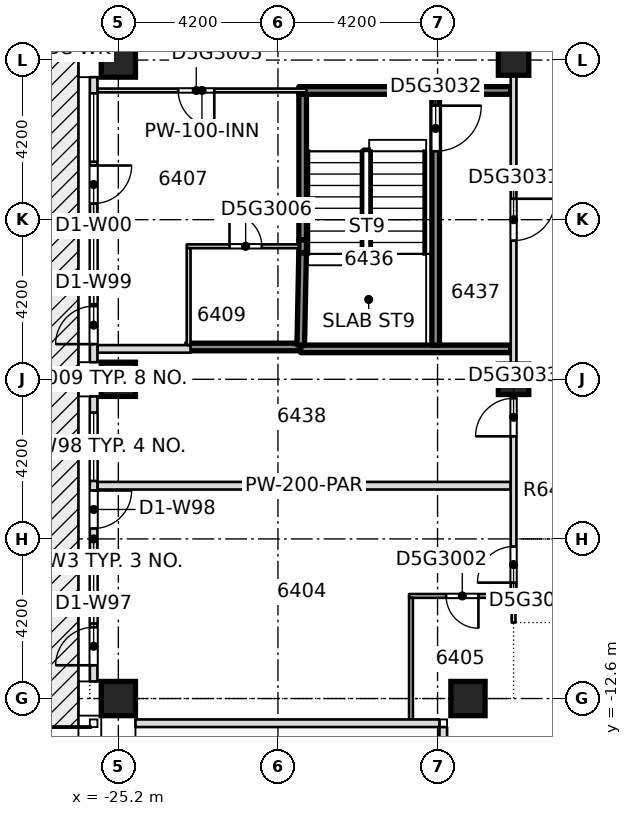
"""IFC4 building model, lengths in metres.
Left out: names, types, materials, properties, quantities, classifications, styles, units other than length and angle.
Written with IfcOpenShell. Run it as: python <this file> out.ifc"""

import sys

from ifc_helpers import new_model, si_unit, direction, frame, frame_2d, origin, origin_2d, place, context, subcontext, project, spatial, rectangle, extrude, element, fill, save


model = new_model("IFC4")
c1 = context("Model", 3, precision=1e-05, world=origin(), true_north=direction((0.0, 1.0)))
c2 = subcontext(c1, "Body", "Model", "MODEL_VIEW")
j1 = project(units=[si_unit("LENGTHUNIT", "METRE"), si_unit("PLANEANGLEUNIT", "RADIAN")], contexts=[c1])
p1 = place(None, origin())
s1 = spatial("IfcSite", under=j1, at=p1, CompositionType="ELEMENT")
p2 = place(p1, origin())
s2 = spatial("IfcBuilding", under=s1, at=p2, CompositionType="ELEMENT")
p3 = place(p2, frame((0.0, 0.0, 244.15)))
s3 = spatial("IfcBuildingStorey", under=s2, at=p3, CompositionType="ELEMENT", Elevation=244.15)
for number, where, z_axis, x_axis in (
    (1, (-25.2, -12.6, -0.4), (0.0, 0.0, 1.0), (1.0, 0.0, 0.0)),
    (2, (-16.0, -12.6, -0.4), (0.0, 0.0, 1.0), (1.0, 0.0, 0.0)),
    (3, (-25.2, -4.2, -0.4), (0.0, 0.0, 1.0), (1.0, 0.0, 0.0)),
    (4, (-25.2, 4.2, -0.4), (0.0, 0.0, 1.0), (1.0, 0.0, 0.0)),
):
    element("IfcColumn", number, at=place(p3, frame(where, z_axis=z_axis, x_axis=x_axis)), inside=s3, PredefinedType="COLUMN", context=c2, shape_type="SweptSolid", body=[
        extrude(rectangle(XDim=0.9, YDim=0.9, at=origin_2d()), origin(), (0.0, 0.0, 1.0), 3.45),
    ])
for number, where, z_axis, x_axis in (
    (5, (-14.8, -4.2, -0.4), (0.0, 0.0, 1.0), (1.0, 0.0, 0.0)),
    (6, (-14.8, 4.2, -0.4), (0.0, 0.0, 1.0), (1.0, 0.0, 0.0)),
):
    element("IfcColumn", number, at=place(p3, frame(where, z_axis=z_axis, x_axis=x_axis)), inside=s3, PredefinedType="COLUMN", context=c2, shape_type="SweptSolid", body=[
        extrude(rectangle(XDim=0.8, YDim=0.8, at=origin_2d()), origin(), (0.0, 0.0, 1.0), 3.45),
    ])
p4 = place(p3, frame((-17.55, -9.9, 0.0), z_axis=(0.0, 0.0, 1.0), x_axis=(1.0, 0.0, 0.0)))
e7 = element("IfcWall", 7, at=p4, inside=s3, PredefinedType="PARTITIONING", context=c2, shape_type="SweptSolid", body=[
    extrude(rectangle(XDim=2.825, YDim=0.1, at=frame_2d((1.413, 0.0))), origin(), (0.0, 0.0, 1.0), 3.05),
])
p5 = place(p4, frame((0.975, 0.0, 0.0)))
e8 = element("IfcOpeningElement", 8, at=p5, cuts=e7, PredefinedType="OPENING", context=c2, shape_type="SweptSolid", body=[
    extrude(rectangle(XDim=0.85, YDim=2.1, at=frame_2d((0.425, 1.05))), frame((0.0, 0.06, 0.0), z_axis=(0.0, -1.0, 0.0), x_axis=(1.0, 0.0, 0.0)), (0.0, 0.0, 1.0), 0.12),
])
p6 = place(p3, frame((-25.75, -7.0, 0.0), z_axis=(0.0, 0.0, 1.0), x_axis=(1.0, 0.0, 0.0)))
e9 = element("IfcWall", 9, at=p6, inside=s3, PredefinedType="PARTITIONING", context=c2, shape_type="SweptSolid", body=[
    extrude(rectangle(XDim=10.875, YDim=0.2, at=frame_2d((5.438, 0.0))), origin(), (0.0, 0.0, 1.0), 3.05),
])
p7 = place(p3, frame((-25.75, -3.4, 0.0), z_axis=(0.0, 0.0, 1.0), x_axis=(1.0, 0.0, 0.0)))
e10 = element("IfcWall", 10, at=p7, inside=s3, PredefinedType="PARTITIONING", context=c2, shape_type="SweptSolid", body=[
    extrude(rectangle(XDim=2.45, YDim=0.2, at=frame_2d((1.225, 0.0))), origin(), (0.0, 0.0, 1.0), 3.05),
])
p8 = place(p3, frame((-23.4, -3.35, 0.0), z_axis=(0.0, 0.0, 1.0), x_axis=(1.0, 0.0, 0.0)))
e11 = element("IfcWall", 11, at=p8, inside=s3, PredefinedType="SOLIDWALL", context=c2, shape_type="SweptSolid", body=[
    extrude(rectangle(XDim=3.1, YDim=0.2, at=frame_2d((1.55, 0.0))), origin(), (0.0, 0.0, 1.0), 3.05),
])
p9 = place(p3, frame((-20.4, -3.4, 0.0), z_axis=(0.0, 0.0, 1.0), x_axis=(1.0, 0.0, 0.0)))
e12 = element("IfcWall", 12, at=p9, inside=s3, PredefinedType="SOLIDWALL", context=c2, shape_type="SweptSolid", body=[
    extrude(rectangle(XDim=5.525, YDim=0.2, at=frame_2d((2.762, 0.0))), origin(), (0.0, 0.0, 1.0), 3.05),
])
p10 = place(p3, frame((-23.4, -0.7, 0.0), z_axis=(0.0, 0.0, 1.0), x_axis=(1.0, 0.0, 0.0)))
e13 = element("IfcWall", 13, at=p10, inside=s3, PredefinedType="PARTITIONING", context=c2, shape_type="SweptSolid", body=[
    extrude(rectangle(XDim=2.95, YDim=0.1, at=frame_2d((1.475, 0.0))), origin(), (0.0, 0.0, 1.0), 3.05),
])
p11 = place(p10, frame((1.125, 0.0, 0.0)))
e14 = element("IfcOpeningElement", 14, at=p11, cuts=e13, PredefinedType="OPENING", context=c2, shape_type="SweptSolid", body=[
    extrude(rectangle(XDim=0.85, YDim=2.1, at=frame_2d((0.425, 1.05))), frame((0.0, 0.06, 0.0), z_axis=(0.0, -1.0, 0.0), x_axis=(1.0, 0.0, 0.0)), (0.0, 0.0, 1.0), 0.12),
])
p12 = place(p3, frame((-25.75, 3.4, 0.0), z_axis=(0.0, 0.0, 1.0), x_axis=(1.0, 0.0, 0.0)))
e15 = element("IfcWall", 15, at=p12, inside=s3, PredefinedType="PARTITIONING", context=c2, shape_type="SweptSolid", body=[
    extrude(rectangle(XDim=5.5, YDim=0.1, at=frame_2d((2.75, 0.0))), origin(), (0.0, 0.0, 1.0), 3.05),
])
p13 = place(p12, frame((2.125, 0.0, 0.0)))
e16 = element("IfcOpeningElement", 16, at=p13, cuts=e15, PredefinedType="OPENING", context=c2, shape_type="SweptSolid", body=[
    extrude(rectangle(XDim=0.95, YDim=2.1, at=frame_2d((0.475, 1.05))), frame((0.0, 0.06, 0.0), z_axis=(0.0, -1.0, 0.0), x_axis=(1.0, 0.0, 0.0)), (0.0, 0.0, 1.0), 0.12),
])
p14 = place(p3, frame((-20.45, 3.4, 0.0), z_axis=(0.0, 0.0, 1.0), x_axis=(1.0, 0.0, 0.0)))
e17 = element("IfcWall", 17, at=p14, inside=s3, PredefinedType="SOLIDWALL", context=c2, shape_type="SweptSolid", body=[
    extrude(rectangle(XDim=5.575, YDim=0.2, at=frame_2d((2.788, 0.0))), origin(), (0.0, 0.0, 1.0), 3.05),
])
p15 = place(p3, frame((-23.35, -3.3, 0.0), z_axis=(0.0, 0.0, 1.0), x_axis=(0.0, 1.0, 0.0)))
e18 = element("IfcWall", 18, at=p15, inside=s3, PredefinedType="PARTITIONING", context=c2, shape_type="SweptSolid", body=[
    extrude(rectangle(XDim=2.55, YDim=0.1, at=frame_2d((1.275, 0.0))), origin(), (0.0, 0.0, 1.0), 3.05),
])
p16 = place(p3, frame((-20.4, -3.3, 0.0), z_axis=(0.0, 0.0, 1.0), x_axis=(0.019989976481, 0.999800180456, 0.0)))
e19 = element("IfcWall", 19, at=p16, inside=s3, PredefinedType="SOLIDWALL", context=c2, shape_type="SweptSolid", body=[
    extrude(rectangle(XDim=2.43, YDim=0.2, at=frame_2d((1.215, 0.0))), origin(), (0.0, 0.0, 1.0), 3.05),
])
p17 = place(p3, frame((-20.35, -0.53, 0.0), z_axis=(0.0, 0.0, 1.0), x_axis=(0.0, 1.0, 0.0)))
e20 = element("IfcWall", 20, at=p17, inside=s3, PredefinedType="SOLIDWALL", context=c2, shape_type="SweptSolid", body=[
    extrude(rectangle(XDim=3.83, YDim=0.2, at=frame_2d((1.915, 0.0))), origin(), (0.0, 0.0, 1.0), 3.05),
])
p18 = place(p3, frame((-17.5, -13.15, 0.0), z_axis=(0.0, 0.0, 1.0), x_axis=(0.0, 1.0, 0.0)))
e21 = element("IfcWall", 21, at=p18, inside=s3, PredefinedType="PARTITIONING", context=c2, shape_type="SweptSolid", body=[
    extrude(rectangle(XDim=3.2, YDim=0.1, at=frame_2d((1.6, 0.0))), origin(), (0.0, 0.0, 1.0), 3.05),
])
p19 = place(p3, frame((-16.85, -3.3, 0.0), z_axis=(0.0, 0.0, 1.0), x_axis=(0.0, 1.0, 0.0)))
e22 = element("IfcWall", 22, at=p19, inside=s3, PredefinedType="SOLIDWALL", context=c2, shape_type="SweptSolid", body=[
    extrude(rectangle(XDim=6.6, YDim=0.2, at=frame_2d((3.3, 0.0))), origin(), (0.0, 0.0, 1.0), 3.05),
])
p20 = place(p19, frame((5.1, 0.0, 0.0)))
e23 = element("IfcOpeningElement", 23, at=p20, cuts=e22, PredefinedType="OPENING", context=c2, shape_type="SweptSolid", body=[
    extrude(rectangle(XDim=1.2, YDim=2.1, at=frame_2d((0.6, 1.05))), frame((0.0, 0.11, 0.0), z_axis=(0.0, -1.0, 0.0), x_axis=(1.0, 0.0, 0.0)), (0.0, 0.0, 1.0), 0.22),
])
p21 = place(p3, frame((-14.8, -10.6, 0.0), z_axis=(0.0, 0.0, 1.0), x_axis=(0.0, 1.0, 0.0)))
e24 = element("IfcWall", 24, at=p21, inside=s3, PredefinedType="PARTITIONING", context=c2, shape_type="SweptSolid", body=[
    extrude(rectangle(XDim=0.65, YDim=0.1, at=frame_2d((0.325, 0.0))), origin(), (0.0, 0.0, 1.0), 3.05),
])
p22 = place(p3, frame((-14.8, -9.85, 0.0), z_axis=(0.0, 0.0, 1.0), x_axis=(0.0, 1.0, 0.0)))
e25 = element("IfcWall", 25, at=p22, inside=s3, PredefinedType="PARTITIONING", context=c2, shape_type="SweptSolid", body=[
    extrude(rectangle(XDim=31.4, YDim=0.15, at=frame_2d((15.7, 0.0))), origin(), (0.0, 0.0, 1.0), 3.05),
])
p23 = place(p22, frame((0.3, 0.0, 0.0)))
e26 = element("IfcOpeningElement", 26, at=p23, cuts=e25, PredefinedType="OPENING", context=c2, shape_type="SweptSolid", body=[
    extrude(rectangle(XDim=0.95, YDim=2.1, at=frame_2d((0.475, 1.05))), frame((0.0, 0.085, 0.0), z_axis=(0.0, -1.0, 0.0), x_axis=(1.0, 0.0, 0.0)), (0.0, 0.0, 1.0), 0.17),
])
p24 = place(p22, frame((17.725, 0.0, 0.0)))
e27 = element("IfcOpeningElement", 27, at=p24, cuts=e25, PredefinedType="OPENING", context=c2, shape_type="SweptSolid", body=[
    extrude(rectangle(XDim=1.0, YDim=2.1, at=frame_2d((0.5, 1.05))), frame((0.0, 0.085, 0.0), z_axis=(0.0, -1.0, 0.0), x_axis=(1.0, 0.0, 0.0)), (0.0, 0.0, 1.0), 0.17),
])
p25 = place(p22, frame((24.8, 0.0, 0.0)))
e28 = element("IfcOpeningElement", 28, at=p25, cuts=e25, PredefinedType="OPENING", context=c2, shape_type="SweptSolid", body=[
    extrude(rectangle(XDim=0.95, YDim=2.1, at=frame_2d((0.475, 1.05))), frame((0.0, 0.085, 0.0), z_axis=(0.0, -1.0, 0.0), x_axis=(1.0, 0.0, 0.0)), (0.0, 0.0, 1.0), 0.17),
])
p26 = place(p22, frame((28.7, 0.0, 0.0)))
e29 = element("IfcOpeningElement", 29, at=p26, cuts=e25, PredefinedType="OPENING", context=c2, shape_type="SweptSolid", body=[
    extrude(rectangle(XDim=0.95, YDim=2.1, at=frame_2d((0.475, 1.05))), frame((0.0, 0.085, 0.0), z_axis=(0.0, -1.0, 0.0), x_axis=(1.0, 0.0, 0.0)), (0.0, 0.0, 1.0), 0.17),
])
p27 = place(p22, frame((9.3, 0.0, 0.0)))
e30 = element("IfcOpeningElement", 30, at=p27, cuts=e25, PredefinedType="OPENING", context=c2, shape_type="SweptSolid", body=[
    extrude(rectangle(XDim=1.1, YDim=2.1, at=frame_2d((0.55, 1.05))), frame((0.0, 0.085, 0.0), z_axis=(0.0, -1.0, 0.0), x_axis=(1.0, 0.0, 0.0)), (0.0, 0.0, 1.0), 0.17),
])
p28 = place(p22, frame((4.15, 0.0, 0.0)))
e31 = element("IfcOpeningElement", 31, at=p28, cuts=e25, PredefinedType="OPENING", context=c2, shape_type="SweptSolid", body=[
    extrude(rectangle(XDim=1.0, YDim=2.1, at=frame_2d((0.5, 1.05))), frame((0.0, 0.085, 0.0), z_axis=(0.0, -1.0, 0.0), x_axis=(1.0, 0.0, 0.0)), (0.0, 0.0, 1.0), 0.17),
])
p29 = place(p3, frame((-25.85, 3.75, 0.0), z_axis=(0.0, 0.0, 1.0), x_axis=(0.0, -1.0, 0.0)))
e32 = element("IfcWall", 32, at=p29, inside=s3, PredefinedType="STANDARD", context=c2, shape_type="SweptSolid", body=[
    extrude(rectangle(XDim=7.5, YDim=0.2, at=frame_2d((3.75, 0.0))), origin(), (0.0, 0.0, 1.0), 3.05),
])
p30 = place(p29, frame((4.175, 0.0, 0.2)))
e33 = element("IfcOpeningElement", 33, at=p30, cuts=e32, PredefinedType="OPENING", context=c2, shape_type="SweptSolid", body=[
    extrude(rectangle(XDim=1.8, YDim=2.65, at=frame_2d((0.9, 1.325))), frame((0.0, 0.11, 0.0), z_axis=(0.0, -1.0, 0.0), x_axis=(1.0, 0.0, 0.0)), (0.0, 0.0, 1.0), 0.22),
])
p31 = place(p29, frame((6.025, 0.0, 0.0)))
e34 = element("IfcOpeningElement", 34, at=p31, cuts=e32, PredefinedType="OPENING", context=c2, shape_type="SweptSolid", body=[
    extrude(rectangle(XDim=1.0, YDim=2.4, at=frame_2d((0.5, 1.2))), frame((0.0, 0.11, 0.0), z_axis=(0.0, -1.0, 0.0), x_axis=(1.0, 0.0, 0.0)), (0.0, 0.0, 1.0), 0.22),
])
p32 = place(p29, frame((0.425, 0.0, 0.2)))
e35 = element("IfcOpeningElement", 35, at=p32, cuts=e32, PredefinedType="OPENING", context=c2, shape_type="SweptSolid", body=[
    extrude(rectangle(XDim=1.8, YDim=2.65, at=frame_2d((0.9, 1.325))), frame((0.0, 0.11, 0.0), z_axis=(0.0, -1.0, 0.0), x_axis=(1.0, 0.0, 0.0)), (0.0, 0.0, 1.0), 0.22),
])
p33 = place(p29, frame((2.325, 0.0, 0.0)))
e36 = element("IfcOpeningElement", 36, at=p33, cuts=e32, PredefinedType="OPENING", context=c2, shape_type="SweptSolid", body=[
    extrude(rectangle(XDim=1.0, YDim=2.4, at=frame_2d((0.5, 1.2))), frame((0.0, 0.11, 0.0), z_axis=(0.0, -1.0, 0.0), x_axis=(1.0, 0.0, 0.0)), (0.0, 0.0, 1.0), 0.22),
])
p34 = place(p3, frame((-25.85, -4.65, 0.0), z_axis=(0.0, 0.0, 1.0), x_axis=(0.0, -1.0, 0.0)))
e37 = element("IfcWall", 37, at=p34, inside=s3, PredefinedType="STANDARD", context=c2, shape_type="SweptSolid", body=[
    extrude(rectangle(XDim=7.5, YDim=0.2, at=frame_2d((3.75, 0.0))), origin(), (0.0, 0.0, 1.0), 3.05),
])
p35 = place(p34, frame((4.175, 0.0, 0.2)))
e38 = element("IfcOpeningElement", 38, at=p35, cuts=e37, PredefinedType="OPENING", context=c2, shape_type="SweptSolid", body=[
    extrude(rectangle(XDim=1.8, YDim=2.65, at=frame_2d((0.9, 1.325))), frame((0.0, 0.11, 0.0), z_axis=(0.0, -1.0, 0.0), x_axis=(1.0, 0.0, 0.0)), (0.0, 0.0, 1.0), 0.22),
])
p36 = place(p34, frame((6.075, 0.0, 0.0)))
e39 = element("IfcOpeningElement", 39, at=p36, cuts=e37, PredefinedType="OPENING", context=c2, shape_type="SweptSolid", body=[
    extrude(rectangle(XDim=1.0, YDim=2.4, at=frame_2d((0.5, 1.2))), frame((0.0, 0.11, 0.0), z_axis=(0.0, -1.0, 0.0), x_axis=(1.0, 0.0, 0.0)), (0.0, 0.0, 1.0), 0.22),
])
p37 = place(p34, frame((0.425, 0.0, 0.2)))
e40 = element("IfcOpeningElement", 40, at=p37, cuts=e37, PredefinedType="OPENING", context=c2, shape_type="SweptSolid", body=[
    extrude(rectangle(XDim=1.8, YDim=2.65, at=frame_2d((0.9, 1.325))), frame((0.0, 0.11, 0.0), z_axis=(0.0, -1.0, 0.0), x_axis=(1.0, 0.0, 0.0)), (0.0, 0.0, 1.0), 0.22),
])
p38 = place(p34, frame((2.475, 0.0, 0.0)))
e41 = element("IfcOpeningElement", 41, at=p38, cuts=e37, PredefinedType="OPENING", context=c2, shape_type="SweptSolid", body=[
    extrude(rectangle(XDim=1.0, YDim=2.4, at=frame_2d((0.5, 1.2))), frame((0.0, 0.11, 0.0), z_axis=(0.0, -1.0, 0.0), x_axis=(1.0, 0.0, 0.0)), (0.0, 0.0, 1.0), 0.22),
])
p39 = place(p3, frame((-24.75, -13.25, 0.0), z_axis=(0.0, 0.0, 1.0), x_axis=(1.0, 0.0, 0.0)))
e42 = element("IfcWall", 42, at=p39, inside=s3, PredefinedType="STANDARD", context=c2, shape_type="SweptSolid", body=[
    extrude(rectangle(XDim=8.0, YDim=0.2, at=frame_2d((4.0, 0.0))), origin(), (0.0, 0.0, 1.0), 3.05),
])
p40 = place(p3, frame((-16.65, -13.35, 0.0), z_axis=(0.0, 0.0, 1.0), x_axis=(0.0, -1.0, 0.0)))
e43 = element("IfcWall", 43, at=p40, inside=s3, PredefinedType="STANDARD", context=c2, shape_type="SweptSolid", body=[
    extrude(rectangle(XDim=7.2, YDim=0.2, at=frame_2d((3.6, 0.0))), origin(), (0.0, 0.0, 1.0), 3.05),
])
p41 = place(p40, frame((3.875, 0.0, 0.2)))
e44 = element("IfcOpeningElement", 44, at=p41, cuts=e43, PredefinedType="OPENING", context=c2, shape_type="SweptSolid", body=[
    extrude(rectangle(XDim=1.8, YDim=2.65, at=frame_2d((0.9, 1.325))), frame((0.0, 0.11, 0.0), z_axis=(0.0, -1.0, 0.0), x_axis=(1.0, 0.0, 0.0)), (0.0, 0.0, 1.0), 0.22),
])
p42 = place(p40, frame((0.275, 0.0, 0.2)))
e45 = element("IfcOpeningElement", 45, at=p42, cuts=e43, PredefinedType="OPENING", context=c2, shape_type="SweptSolid", body=[
    extrude(rectangle(XDim=1.8, YDim=2.65, at=frame_2d((0.9, 1.325))), frame((0.0, 0.11, 0.0), z_axis=(0.0, -1.0, 0.0), x_axis=(1.0, 0.0, 0.0)), (0.0, 0.0, 1.0), 0.22),
])
p43 = place(p3, frame((-20.35, -0.87, 0.0), z_axis=(0.0, 0.0, 1.0), x_axis=(0.0, 1.0, 0.0)))
e46 = element("IfcWall", 46, at=p43, inside=s3, PredefinedType="SOLIDWALL", context=c2, shape_type="SweptSolid", body=[
    extrude(rectangle(XDim=0.34, YDim=0.2, at=frame_2d((0.17, 0.0))), origin(), (0.0, 0.0, 1.0), 3.05),
])
p44 = place(p23, origin())
e47 = element("IfcDoor", 47, at=p44, inside=s3, OperationType="SINGLE_SWING_LEFT", PredefinedType="DOOR", context=c2, shape_type="SweptSolid", body=[
    extrude(rectangle(XDim=0.95, YDim=2.1, at=frame_2d((0.475, 1.05))), frame((0.0, 0.025, 0.0), z_axis=(0.0, -1.0, 0.0), x_axis=(1.0, 0.0, 0.0)), (0.0, 0.0, 1.0), 0.05),
])
fill(e26, e47)
p45 = place(p5, origin())
e48 = element("IfcDoor", 48, at=p45, inside=s3, OperationType="SINGLE_SWING_RIGHT", PredefinedType="DOOR", context=c2, shape_type="SweptSolid", body=[
    extrude(rectangle(XDim=0.85, YDim=2.1, at=frame_2d((0.425, 1.05))), frame((0.0, 0.025, 0.0), z_axis=(0.0, -1.0, 0.0), x_axis=(1.0, 0.0, 0.0)), (0.0, 0.0, 1.0), 0.05),
])
fill(e8, e48)
p46 = place(p13, origin())
e49 = element("IfcDoor", 49, at=p46, inside=s3, OperationType="SINGLE_SWING_LEFT", PredefinedType="DOOR", context=c2, shape_type="SweptSolid", body=[
    extrude(rectangle(XDim=0.95, YDim=2.1, at=frame_2d((0.475, 1.05))), frame((0.0, 0.025, 0.0), z_axis=(0.0, -1.0, 0.0), x_axis=(1.0, 0.0, 0.0)), (0.0, 0.0, 1.0), 0.05),
])
fill(e16, e49)
p47 = place(p11, origin())
e50 = element("IfcDoor", 50, at=p47, inside=s3, OperationType="SINGLE_SWING_RIGHT", PredefinedType="DOOR", context=c2, shape_type="SweptSolid", body=[
    extrude(rectangle(XDim=0.85, YDim=2.1, at=frame_2d((0.425, 1.05))), frame((0.0, 0.025, 0.0), z_axis=(0.0, -1.0, 0.0), x_axis=(1.0, 0.0, 0.0)), (0.0, 0.0, 1.0), 0.05),
])
fill(e14, e50)
p48 = place(p27, origin())
e51 = element("IfcDoor", 51, at=p48, inside=s3, OperationType="SINGLE_SWING_RIGHT", PredefinedType="DOOR", context=c2, shape_type="SweptSolid", body=[
    extrude(rectangle(XDim=1.1, YDim=2.1, at=frame_2d((0.55, 1.05))), frame((0.0, 0.025, 0.0), z_axis=(0.0, -1.0, 0.0), x_axis=(1.0, 0.0, 0.0)), (0.0, 0.0, 1.0), 0.05),
])
fill(e30, e51)
p49 = place(p20, origin())
e52 = element("IfcDoor", 52, at=p49, inside=s3, OperationType="SINGLE_SWING_RIGHT", PredefinedType="DOOR", context=c2, shape_type="SweptSolid", body=[
    extrude(rectangle(XDim=1.2, YDim=2.1, at=frame_2d((0.6, 1.05))), frame((0.0, 0.025, 0.0), z_axis=(0.0, -1.0, 0.0), x_axis=(1.0, 0.0, 0.0)), (0.0, 0.0, 1.0), 0.05),
])
fill(e23, e52)
p50 = place(p28, origin())
e53 = element("IfcDoor", 53, at=p50, inside=s3, OperationType="SINGLE_SWING_LEFT", PredefinedType="DOOR", context=c2, shape_type="SweptSolid", body=[
    extrude(rectangle(XDim=1.0, YDim=2.1, at=frame_2d((0.5, 1.05))), frame((0.0, 0.025, 0.0), z_axis=(0.0, -1.0, 0.0), x_axis=(1.0, 0.0, 0.0)), (0.0, 0.0, 1.0), 0.05),
])
fill(e31, e53)
p51 = place(p30, origin())
e54 = element("IfcWindow", 54, at=p51, inside=s3, PartitioningType="SINGLE_PANEL", PredefinedType="WINDOW", context=c2, shape_type="SweptSolid", body=[
    extrude(rectangle(XDim=1.8, YDim=2.65, at=frame_2d((0.9, 1.325))), frame((0.0, 0.03, 0.0), z_axis=(0.0, -1.0, 0.0), x_axis=(1.0, 0.0, 0.0)), (0.0, 0.0, 1.0), 0.06),
])
fill(e33, e54)
p52 = place(p31, origin())
e55 = element("IfcDoor", 55, at=p52, inside=s3, OperationType="SINGLE_SWING_LEFT", PredefinedType="DOOR", context=c2, shape_type="SweptSolid", body=[
    extrude(rectangle(XDim=1.0, YDim=2.4, at=frame_2d((0.5, 1.2))), frame((0.0, 0.025, 0.0), z_axis=(0.0, -1.0, 0.0), x_axis=(1.0, 0.0, 0.0)), (0.0, 0.0, 1.0), 0.05),
])
fill(e34, e55)
p53 = place(p32, origin())
e56 = element("IfcWindow", 56, at=p53, inside=s3, PartitioningType="SINGLE_PANEL", PredefinedType="WINDOW", context=c2, shape_type="SweptSolid", body=[
    extrude(rectangle(XDim=1.8, YDim=2.65, at=frame_2d((0.9, 1.325))), frame((0.0, 0.03, 0.0), z_axis=(0.0, -1.0, 0.0), x_axis=(1.0, 0.0, 0.0)), (0.0, 0.0, 1.0), 0.06),
])
fill(e35, e56)
p54 = place(p33, origin())
e57 = element("IfcDoor", 57, at=p54, inside=s3, OperationType="SINGLE_SWING_LEFT", PredefinedType="DOOR", context=c2, shape_type="SweptSolid", body=[
    extrude(rectangle(XDim=1.0, YDim=2.4, at=frame_2d((0.5, 1.2))), frame((0.0, 0.025, 0.0), z_axis=(0.0, -1.0, 0.0), x_axis=(1.0, 0.0, 0.0)), (0.0, 0.0, 1.0), 0.05),
])
fill(e36, e57)
p55 = place(p35, origin())
e58 = element("IfcWindow", 58, at=p55, inside=s3, PartitioningType="SINGLE_PANEL", PredefinedType="WINDOW", context=c2, shape_type="SweptSolid", body=[
    extrude(rectangle(XDim=1.8, YDim=2.65, at=frame_2d((0.9, 1.325))), frame((0.0, 0.03, 0.0), z_axis=(0.0, -1.0, 0.0), x_axis=(1.0, 0.0, 0.0)), (0.0, 0.0, 1.0), 0.06),
])
fill(e38, e58)
p56 = place(p36, origin())
e59 = element("IfcDoor", 59, at=p56, inside=s3, OperationType="SINGLE_SWING_LEFT", PredefinedType="DOOR", context=c2, shape_type="SweptSolid", body=[
    extrude(rectangle(XDim=1.0, YDim=2.4, at=frame_2d((0.5, 1.2))), frame((0.0, 0.025, 0.0), z_axis=(0.0, -1.0, 0.0), x_axis=(1.0, 0.0, 0.0)), (0.0, 0.0, 1.0), 0.05),
])
fill(e39, e59)
p57 = place(p37, origin())
e60 = element("IfcWindow", 60, at=p57, inside=s3, PartitioningType="SINGLE_PANEL", PredefinedType="WINDOW", context=c2, shape_type="SweptSolid", body=[
    extrude(rectangle(XDim=1.8, YDim=2.65, at=frame_2d((0.9, 1.325))), frame((0.0, 0.03, 0.0), z_axis=(0.0, -1.0, 0.0), x_axis=(1.0, 0.0, 0.0)), (0.0, 0.0, 1.0), 0.06),
])
fill(e40, e60)
p58 = place(p38, origin())
e61 = element("IfcDoor", 61, at=p58, inside=s3, OperationType="SINGLE_SWING_LEFT", PredefinedType="DOOR", context=c2, shape_type="SweptSolid", body=[
    extrude(rectangle(XDim=1.0, YDim=2.4, at=frame_2d((0.5, 1.2))), frame((0.0, 0.025, 0.0), z_axis=(0.0, -1.0, 0.0), x_axis=(1.0, 0.0, 0.0)), (0.0, 0.0, 1.0), 0.05),
])
fill(e41, e61)
save(model, sys.argv[1])
